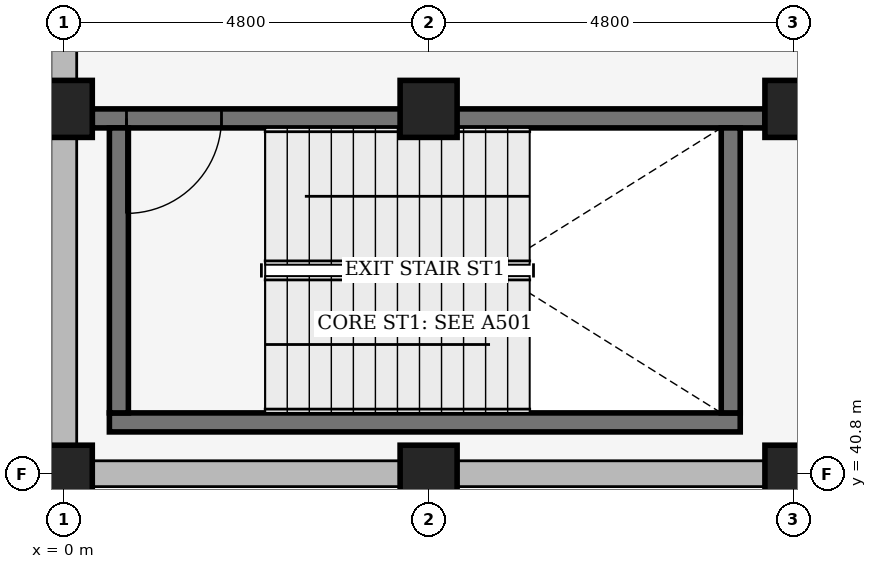
"""IFC4 building model, lengths in metres.
Left out: names, types, materials, properties, quantities, classifications, styles, units other than length and angle.
Written with IfcOpenShell. Run it as: python <this file> out.ifc"""

import sys

from ifc_helpers import new_model, si_unit, direction, frame, frame_2d, origin, origin_2d, place, context, subcontext, project, spatial, rectangle, extrude, element, fill, save


model = new_model("IFC4")
c1 = context("Model", 3, precision=1e-05, world=origin(), true_north=direction((0.0, 1.0)))
c2 = subcontext(c1, "Body", "Model", "MODEL_VIEW")
j1 = project(units=[si_unit("LENGTHUNIT", "METRE"), si_unit("PLANEANGLEUNIT", "RADIAN")], contexts=[c1])
p1 = place(None, origin())
s1 = spatial("IfcSite", under=j1, at=p1, CompositionType="ELEMENT")
p2 = place(p1, origin())
s2 = spatial("IfcBuilding", under=s1, at=p2, CompositionType="ELEMENT")
p3 = place(p2, frame((0.0, 0.0, 10.5)))
s3 = spatial("IfcBuildingStorey", under=s2, at=p3, CompositionType="ELEMENT", Elevation=10.5)
for number, where, z_axis, x_axis in (
    (1, (0.0, 40.8, 0.0), (0.0, 0.0, 1.0), (1.0, 0.0, 0.0)),
    (2, (0.0, 45.6, 0.0), (0.0, 0.0, 1.0), (1.0, 0.0, 0.0)),
    (3, (4.8, 40.8, 0.0), (0.0, 0.0, 1.0), (1.0, 0.0, 0.0)),
    (4, (4.8, 45.6, 0.0), (0.0, 0.0, 1.0), (1.0, 0.0, 0.0)),
    (5, (9.6, 40.8, 0.0), (0.0, 0.0, 1.0), (1.0, 0.0, 0.0)),
    (6, (9.6, 45.6, 0.0), (0.0, 0.0, 1.0), (1.0, 0.0, 0.0)),
):
    element("IfcColumn", number, at=place(p3, frame(where, z_axis=z_axis, x_axis=x_axis)), inside=s3, PredefinedType="COLUMN", context=c2, shape_type="SweptSolid", body=[
        extrude(rectangle(XDim=0.75, YDim=0.75, at=origin_2d()), origin(), (0.0, 0.0, 1.0), 4.8),
    ])
p4 = place(p3, frame((0.0, 50.017, 0.0), z_axis=(0.0, 0.0, 1.0), x_axis=(0.0, -1.0, 0.0)))
e7 = element("IfcWall", 7, at=p4, inside=s3, PredefinedType="SOLIDWALL", context=c2, shape_type="SweptSolid", body=[
    extrude(rectangle(XDim=4.034, YDim=0.34, at=frame_2d((2.017, 0.0))), origin(), (0.0, 0.0, 1.0), 4.058),
])
for number, where, z_axis, x_axis in (
    (8, (0.0, 45.217, 0.0), (0.0, 0.0, 1.0), (0.0, -1.0, 0.0)),
    (9, (0.383, 40.8, 0.0), (0.0, 0.0, 1.0), (1.0, 0.0, 0.0)),
):
    element("IfcWall", number, at=place(p3, frame(where, z_axis=z_axis, x_axis=x_axis)), inside=s3, PredefinedType="SOLIDWALL", context=c2, shape_type="SweptSolid", body=[
        extrude(rectangle(XDim=4.034, YDim=0.34, at=frame_2d((2.017, 0.0))), origin(), (0.0, 0.0, 1.0), 4.058),
    ])
p5 = place(p3, frame((5.183, 40.8, 0.0), z_axis=(0.0, 0.0, 1.0), x_axis=(1.0, 0.0, 0.0)))
e10 = element("IfcWall", 10, at=p5, inside=s3, PredefinedType="SOLIDWALL", context=c2, shape_type="SweptSolid", body=[
    extrude(rectangle(XDim=4.034, YDim=0.34, at=frame_2d((2.017, 0.0))), origin(), (0.0, 0.0, 1.0), 4.163),
])
p6 = place(p3, frame((0.6, 41.475, 0.0), z_axis=(0.0, 0.0, 1.0), x_axis=(1.0, 0.0, 0.0)))
e11 = element("IfcWall", 11, at=p6, inside=s3, PredefinedType="SHEAR", context=c2, shape_type="SweptSolid", body=[
    extrude(rectangle(XDim=8.3, YDim=0.25, at=frame_2d((4.15, 0.0))), origin(), (0.0, 0.0, 1.0), 4.4),
])
p7 = place(p3, frame((9.225, 45.475, 0.0), z_axis=(0.0, 0.0, 1.0), x_axis=(-1.0, 0.0, 0.0)))
e12 = element("IfcWall", 12, at=p7, inside=s3, PredefinedType="SHEAR", context=c2, shape_type="SweptSolid", body=[
    extrude(rectangle(XDim=8.85, YDim=0.25, at=frame_2d((4.425, 0.0))), origin(), (0.0, 0.0, 1.0), 4.4),
])
p8 = place(p7, frame((8.4, 0.0, 0.0), z_axis=(0.0, 0.0, 1.0), x_axis=(-1.0, 0.0, 0.0)))
e13 = element("IfcOpeningElement", 13, at=p8, cuts=e12, PredefinedType="OPENING", context=c2, shape_type="SweptSolid", body=[
    extrude(rectangle(XDim=1.25, YDim=2.2, at=frame_2d((0.625, 1.1))), frame((0.0, 0.135, 0.0), z_axis=(0.0, -1.0, 0.0), x_axis=(1.0, 0.0, 0.0)), (0.0, 0.0, 1.0), 0.27),
])
for number, where, z_axis, x_axis in (
    (14, (0.725, 45.35, 0.0), (0.0, 0.0, 1.0), (0.0, -1.0, 0.0)),
    (15, (8.775, 41.6, 0.0), (0.0, 0.0, 1.0), (0.0, 1.0, 0.0)),
):
    element("IfcWall", number, at=place(p3, frame(where, z_axis=z_axis, x_axis=x_axis)), inside=s3, PredefinedType="SHEAR", context=c2, shape_type="SweptSolid", body=[
        extrude(rectangle(XDim=3.75, YDim=0.25, at=frame_2d((1.875, 0.0))), origin(), (0.0, 0.0, 1.0), 4.4),
    ])
p9 = place(p8, origin())
e16 = element("IfcDoor", 16, at=p9, inside=s3, OperationType="SINGLE_SWING_LEFT", PredefinedType="DOOR", context=c2, shape_type="SweptSolid", body=[
    extrude(rectangle(XDim=1.25, YDim=2.2, at=frame_2d((0.625, 1.1))), frame((0.0, 0.025, 0.0), z_axis=(0.0, -1.0, 0.0), x_axis=(1.0, 0.0, 0.0)), (0.0, 0.0, 1.0), 0.05),
])
fill(e13, e16)
save(model, sys.argv[1])
